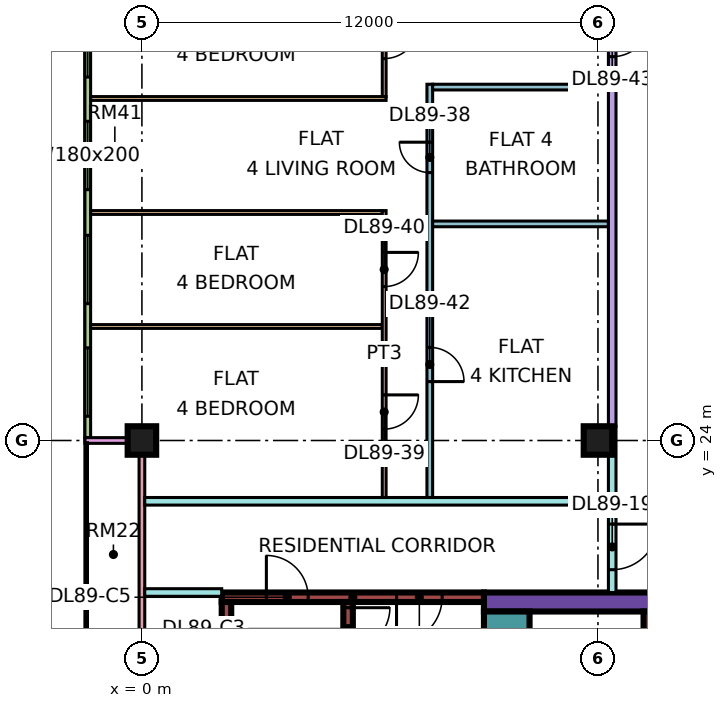
"""IFC4 building model, lengths in metres.
Left out: names, types, materials, properties, quantities, classifications, styles, units other than length and angle.
Written with IfcOpenShell. Run it as: python <this file> out.ifc"""

import sys

from ifc_helpers import new_model, si_unit, direction, frame, frame_2d, origin, origin_2d, place, context, subcontext, project, spatial, rectangle, extrude, element, fill, save


model = new_model("IFC4")
c1 = context("Model", 3, precision=1e-05, world=origin(), true_north=direction((0.0, 1.0)))
c2 = subcontext(c1, "Body", "Model", "MODEL_VIEW")
j1 = project(units=[si_unit("LENGTHUNIT", "METRE"), si_unit("PLANEANGLEUNIT", "RADIAN")], contexts=[c1])
p1 = place(None, origin())
s1 = spatial("IfcSite", under=j1, at=p1, CompositionType="ELEMENT")
p2 = place(p1, origin())
s2 = spatial("IfcBuilding", under=s1, at=p2, CompositionType="ELEMENT")
p3 = place(p2, frame((0.0, 0.0, 380.15)))
s3 = spatial("IfcBuildingStorey", under=s2, at=p3, CompositionType="ELEMENT", Elevation=380.15)
for number, where, z_axis, x_axis in (
    (1, (0.0, 24.0, 0.0), (0.0, 0.0, 1.0), (1.0, 0.0, 0.0)),
    (2, (12.0, 24.0, 0.0), (0.0, 0.0, 1.0), (1.0, 0.0, 0.0)),
):
    element("IfcColumn", number, at=place(p3, frame(where, z_axis=z_axis, x_axis=x_axis)), inside=s3, PredefinedType="COLUMN", context=c2, shape_type="SweptSolid", body=[
        extrude(rectangle(XDim=0.75, YDim=0.75, at=origin_2d()), origin(), (0.0, 0.0, 1.0), 3.75),
    ])
p4 = place(p3, frame((9.0, 19.75, 0.0), z_axis=(0.0, 0.0, 1.0), x_axis=(1.0, 0.0, 0.0)))
e3 = element("IfcWall", 3, at=p4, inside=s3, PredefinedType="SHEAR", context=c2, shape_type="SweptSolid", body=[
    extrude(rectangle(XDim=25.0, YDim=0.5, at=frame_2d((12.5, 0.0))), origin(), (0.0, 0.0, 1.0), 3.75),
])
p5 = place(p4, frame((19.1, 0.0, 0.0)))
e4 = element("IfcOpeningElement", 4, at=p5, cuts=e3, PredefinedType="OPENING", context=c2, shape_type="SweptSolid", body=[
    extrude(rectangle(XDim=1.8, YDim=2.4, at=frame_2d((0.9, 1.2))), frame((0.0, 0.26, 0.0), z_axis=(0.0, -1.0, 0.0), x_axis=(1.0, 0.0, 0.0)), (0.0, 0.0, 1.0), 0.52),
])
p6 = place(p3, frame((9.6, 7.5, 0.0), z_axis=(0.0, 0.0, 1.0), x_axis=(0.0, 1.0, 0.0)))
e5 = element("IfcWall", 5, at=p6, inside=s3, PredefinedType="SHEAR", context=c2, shape_type="SweptSolid", body=[
    extrude(rectangle(XDim=12.0, YDim=1.2, at=frame_2d((6.0, 0.0))), origin(), (0.0, 0.0, 1.0), 3.75),
])
p7 = place(p6, frame((4.375, 0.0, 0.0)))
e6 = element("IfcOpeningElement", 6, at=p7, cuts=e5, PredefinedType="OPENING", context=c2, shape_type="SweptSolid", body=[
    extrude(rectangle(XDim=1.1, YDim=2.2, at=frame_2d((0.55, 1.1))), frame((0.0, 0.61, 0.0), z_axis=(0.0, -1.0, 0.0), x_axis=(1.0, 0.0, 0.0)), (0.0, 0.0, 1.0), 1.22),
])
p8 = place(p6, frame((6.875, 0.0, 0.0)))
e7 = element("IfcOpeningElement", 7, at=p8, cuts=e5, PredefinedType="OPENING", context=c2, shape_type="SweptSolid", body=[
    extrude(rectangle(XDim=1.1, YDim=2.2, at=frame_2d((0.55, 1.1))), frame((0.0, 0.61, 0.0), z_axis=(0.0, -1.0, 0.0), x_axis=(1.0, 0.0, 0.0)), (0.0, 0.0, 1.0), 1.22),
])
p9 = place(p6, frame((9.85, 0.0, 0.0)))
e8 = element("IfcOpeningElement", 8, at=p9, cuts=e5, PredefinedType="OPENING", context=c2, shape_type="SweptSolid", body=[
    extrude(rectangle(XDim=1.1, YDim=2.2, at=frame_2d((0.55, 1.1))), frame((0.0, 0.61, 0.0), z_axis=(0.0, -1.0, 0.0), x_axis=(1.0, 0.0, 0.0)), (0.0, 0.0, 1.0), 1.22),
])
p10 = place(p6, frame((2.05, 0.0, 0.0)))
e9 = element("IfcOpeningElement", 9, at=p10, cuts=e5, PredefinedType="OPENING", context=c2, shape_type="SweptSolid", body=[
    extrude(rectangle(XDim=0.9, YDim=2.1, at=frame_2d((0.45, 1.05))), frame((0.0, 0.61, 0.0), z_axis=(0.0, -1.0, 0.0), x_axis=(1.0, 0.0, 0.0)), (0.0, 0.0, 1.0), 1.22),
])
p11 = place(p3, frame((13.325, 7.5, 0.0), z_axis=(0.0, 0.0, 1.0), x_axis=(0.0, 1.0, 0.0)))
e10 = element("IfcWall", 10, at=p11, inside=s3, PredefinedType="SHEAR", context=c2, shape_type="SweptSolid", body=[
    extrude(rectangle(XDim=12.0, YDim=0.25, at=frame_2d((6.0, 0.0))), origin(), (0.0, 0.0, 1.0), 3.75),
])
p12 = place(p3, frame((2.1, 19.875, 0.0), z_axis=(0.0, 0.0, 1.0), x_axis=(1.0, 0.0, 0.0)))
e11 = element("IfcWall", 11, at=p12, inside=s3, PredefinedType="SHEAR", context=c2, shape_type="SweptSolid", body=[
    extrude(rectangle(XDim=6.9, YDim=0.25, at=frame_2d((3.45, 0.0))), origin(), (0.0, 0.0, 1.0), 3.75),
])
p13 = place(p12, frame((1.175, 0.0, 0.0)))
e12 = element("IfcOpeningElement", 12, at=p13, cuts=e11, PredefinedType="OPENING", context=c2, shape_type="SweptSolid", body=[
    extrude(rectangle(XDim=1.1, YDim=2.2, at=frame_2d((0.55, 1.1))), frame((0.0, 0.135, 0.0), z_axis=(0.0, -1.0, 0.0), x_axis=(1.0, 0.0, 0.0)), (0.0, 0.0, 1.0), 0.27),
])
p14 = place(p12, frame((4.6, 0.0, 0.0)))
e13 = element("IfcOpeningElement", 13, at=p14, cuts=e11, PredefinedType="OPENING", context=c2, shape_type="SweptSolid", body=[
    extrude(rectangle(XDim=1.2, YDim=2.2, at=frame_2d((0.6, 1.1))), frame((0.0, 0.135, 0.0), z_axis=(0.0, -1.0, 0.0), x_axis=(1.0, 0.0, 0.0)), (0.0, 0.0, 1.0), 0.27),
])
p15 = place(p3, frame((2.225, 13.25, 0.0), z_axis=(0.0, 0.0, 1.0), x_axis=(0.0, 1.0, 0.0)))
e14 = element("IfcWall", 14, at=p15, inside=s3, PredefinedType="SHEAR", context=c2, shape_type="SweptSolid", body=[
    extrude(rectangle(XDim=6.5, YDim=0.25, at=frame_2d((3.25, 0.0))), origin(), (0.0, 0.0, 1.0), 3.75),
])
p16 = place(p3, frame((5.425, 13.25, 0.0), z_axis=(0.0, 0.0, 1.0), x_axis=(0.0, 1.0, 0.0)))
e15 = element("IfcWall", 15, at=p16, inside=s3, PredefinedType="SHEAR", context=c2, shape_type="SweptSolid", body=[
    extrude(rectangle(XDim=6.5, YDim=0.25, at=frame_2d((3.25, 0.0))), origin(), (0.0, 0.0, 1.0), 3.75),
])
p17 = place(p16, frame((5.25, 0.0, 0.0)))
e16 = element("IfcOpeningElement", 16, at=p17, cuts=e15, PredefinedType="OPENING", context=c2, shape_type="SweptSolid", body=[
    extrude(rectangle(XDim=1.1, YDim=2.2, at=frame_2d((0.55, 1.1))), frame((0.0, 0.135, 0.0), z_axis=(0.0, -1.0, 0.0), x_axis=(1.0, 0.0, 0.0)), (0.0, 0.0, 1.0), 0.27),
])
p18 = place(p3, frame((-1.425, 35.925, 0.0), z_axis=(0.0, 0.0, 1.0), x_axis=(0.0, -1.0, 0.0)))
e17 = element("IfcWall", 17, at=p18, inside=s3, PredefinedType="SOLIDWALL", context=c2, shape_type="SweptSolid", body=[
    extrude(rectangle(XDim=11.85, YDim=0.15, at=frame_2d((5.925, 0.0))), origin(), (0.0, 0.0, 1.0), 3.3),
])
p19 = place(p18, frame((0.562, 0.0, 0.45)))
e18 = element("IfcOpeningElement", 18, at=p19, cuts=e17, PredefinedType="OPENING", context=c2, shape_type="SweptSolid", body=[
    extrude(rectangle(XDim=1.8, YDim=2.0, at=frame_2d((0.9, 1.0))), frame((0.0, 0.085, 0.0), z_axis=(0.0, -1.0, 0.0), x_axis=(1.0, 0.0, 0.0)), (0.0, 0.0, 1.0), 0.17),
])
p20 = place(p18, frame((3.525, 0.0, 0.45)))
e19 = element("IfcOpeningElement", 19, at=p20, cuts=e17, PredefinedType="OPENING", context=c2, shape_type="SweptSolid", body=[
    extrude(rectangle(XDim=1.8, YDim=2.0, at=frame_2d((0.9, 1.0))), frame((0.0, 0.085, 0.0), z_axis=(0.0, -1.0, 0.0), x_axis=(1.0, 0.0, 0.0)), (0.0, 0.0, 1.0), 0.17),
])
p21 = place(p18, frame((6.525, 0.0, 0.45)))
e20 = element("IfcOpeningElement", 20, at=p21, cuts=e17, PredefinedType="OPENING", context=c2, shape_type="SweptSolid", body=[
    extrude(rectangle(XDim=1.8, YDim=2.0, at=frame_2d((0.9, 1.0))), frame((0.0, 0.085, 0.0), z_axis=(0.0, -1.0, 0.0), x_axis=(1.0, 0.0, 0.0)), (0.0, 0.0, 1.0), 0.17),
])
p22 = place(p18, frame((9.488, 0.0, 0.45)))
e21 = element("IfcOpeningElement", 21, at=p22, cuts=e17, PredefinedType="OPENING", context=c2, shape_type="SweptSolid", body=[
    extrude(rectangle(XDim=1.8, YDim=2.0, at=frame_2d((0.9, 1.0))), frame((0.0, 0.085, 0.0), z_axis=(0.0, -1.0, 0.0), x_axis=(1.0, 0.0, 0.0)), (0.0, 0.0, 1.0), 0.17),
])
p23 = place(p3, frame((0.0, 23.925, 0.0), z_axis=(0.0, 0.0, 1.0), x_axis=(0.0, -1.0, 0.0)))
e22 = element("IfcWall", 22, at=p23, inside=s3, PredefinedType="SOLIDWALL", context=c2, shape_type="SweptSolid", body=[
    extrude(rectangle(XDim=11.35, YDim=0.15, at=frame_2d((5.675, 0.0))), origin(), (0.0, 0.0, 1.0), 3.3),
])
p24 = place(p23, frame((6.738, 0.0, 0.0)))
e23 = element("IfcOpeningElement", 23, at=p24, cuts=e22, PredefinedType="OPENING", context=c2, shape_type="SweptSolid", body=[
    extrude(rectangle(XDim=1.8, YDim=2.4, at=frame_2d((0.9, 1.2))), frame((0.0, 0.085, 0.0), z_axis=(0.0, -1.0, 0.0), x_axis=(1.0, 0.0, 0.0)), (0.0, 0.0, 1.0), 0.17),
])
p25 = place(p3, frame((-1.5, 24.0, 0.0), z_axis=(0.0, 0.0, 1.0), x_axis=(1.0, 0.0, 0.0)))
e24 = element("IfcWall", 24, at=p25, inside=s3, PredefinedType="SOLIDWALL", context=c2, shape_type="SweptSolid", body=[
    extrude(rectangle(XDim=1.5, YDim=0.15, at=frame_2d((0.75, 0.0))), origin(), (0.0, 0.0, 1.0), 3.3),
])
p26 = place(p3, frame((-1.351, 27.0, 0.0), z_axis=(0.0, 0.0, 1.0), x_axis=(1.0, 0.0, 0.0)))
e25 = element("IfcWall", 25, at=p26, inside=s3, PredefinedType="PARTITIONING", context=c2, shape_type="SweptSolid", body=[
    extrude(rectangle(XDim=7.676, YDim=0.1, at=frame_2d((3.838, 0.0))), origin(), (0.0, 0.0, 1.0), 3.3),
])
p27 = place(p3, frame((-1.35, 30.0, 0.0), z_axis=(0.0, 0.0, 1.0), x_axis=(1.0, 0.0, 0.0)))
e26 = element("IfcWall", 26, at=p27, inside=s3, PredefinedType="PARTITIONING", context=c2, shape_type="SweptSolid", body=[
    extrude(rectangle(XDim=7.675, YDim=0.1, at=frame_2d((3.837, 0.0))), origin(), (0.0, 0.0, 1.0), 3.3),
])
p28 = place(p3, frame((-1.35, 33.0, 0.0), z_axis=(0.0, 0.0, 1.0), x_axis=(1.0, 0.0, 0.0)))
e27 = element("IfcWall", 27, at=p28, inside=s3, PredefinedType="PARTITIONING", context=c2, shape_type="SweptSolid", body=[
    extrude(rectangle(XDim=7.775, YDim=0.1, at=frame_2d((3.888, 0.0))), origin(), (0.0, 0.0, 1.0), 3.3),
])
p29 = place(p3, frame((0.074, 20.0, 0.0), z_axis=(0.0, 0.0, 1.0), x_axis=(1.0, 0.0, 0.0)))
e28 = element("IfcWall", 28, at=p29, inside=s3, PredefinedType="PARTITIONING", context=c2, shape_type="SweptSolid", body=[
    extrude(rectangle(XDim=2.026, YDim=0.2, at=frame_2d((1.013, 0.0))), origin(), (0.0, 0.0, 1.0), 3.3),
])
p30 = place(p3, frame((0.074, 22.4, 0.0), z_axis=(0.0, 0.0, 1.0), x_axis=(1.0, 0.0, 0.0)))
e29 = element("IfcWall", 29, at=p30, inside=s3, PredefinedType="PARTITIONING", context=c2, shape_type="SweptSolid", body=[
    extrude(rectangle(XDim=12.201, YDim=0.2, at=frame_2d((6.101, 0.0))), origin(), (0.0, 0.0, 1.0), 3.3),
])
p31 = place(p3, frame((6.375, 22.5, 0.0), z_axis=(0.0, 0.0, 1.0), x_axis=(0.0, 1.0, 0.0)))
e30 = element("IfcWall", 30, at=p31, inside=s3, PredefinedType="PARTITIONING", context=c2, shape_type="SweptSolid", body=[
    extrude(rectangle(XDim=7.55, YDim=0.1, at=frame_2d((3.775, 0.0))), origin(), (0.0, 0.0, 1.0), 3.3),
])
p32 = place(p31, frame((1.8, 0.0, 0.0)))
e31 = element("IfcOpeningElement", 31, at=p32, cuts=e30, PredefinedType="OPENING", context=c2, shape_type="SweptSolid", body=[
    extrude(rectangle(XDim=0.9, YDim=2.1, at=frame_2d((0.45, 1.05))), frame((0.0, 0.06, 0.0), z_axis=(0.0, -1.0, 0.0), x_axis=(1.0, 0.0, 0.0)), (0.0, 0.0, 1.0), 0.12),
])
p33 = place(p31, frame((5.55, 0.0, 0.0)))
e32 = element("IfcOpeningElement", 32, at=p33, cuts=e30, PredefinedType="OPENING", context=c2, shape_type="SweptSolid", body=[
    extrude(rectangle(XDim=0.9, YDim=2.1, at=frame_2d((0.45, 1.05))), frame((0.0, 0.06, 0.0), z_axis=(0.0, -1.0, 0.0), x_axis=(1.0, 0.0, 0.0)), (0.0, 0.0, 1.0), 0.12),
])
p34 = place(p3, frame((6.375, 33.05, 0.0), z_axis=(0.0, 0.0, 1.0), x_axis=(0.0, 1.0, 0.0)))
e33 = element("IfcWall", 33, at=p34, inside=s3, PredefinedType="PARTITIONING", context=c2, shape_type="SweptSolid", body=[
    extrude(rectangle(XDim=2.85, YDim=0.1, at=frame_2d((1.425, 0.0))), origin(), (0.0, 0.0, 1.0), 3.3),
])
p35 = place(p34, frame((1.0, 0.0, 0.0)))
e34 = element("IfcOpeningElement", 34, at=p35, cuts=e33, PredefinedType="OPENING", context=c2, shape_type="SweptSolid", body=[
    extrude(rectangle(XDim=0.9, YDim=2.1, at=frame_2d((0.45, 1.05))), frame((0.0, 0.06, 0.0), z_axis=(0.0, -1.0, 0.0), x_axis=(1.0, 0.0, 0.0)), (0.0, 0.0, 1.0), 0.12),
])
p36 = place(p3, frame((7.575, 22.5, 0.0), z_axis=(0.0, 0.0, 1.0), x_axis=(0.0, 1.0, 0.0)))
e35 = element("IfcWall", 35, at=p36, inside=s3, PredefinedType="PARTITIONING", context=c2, shape_type="SweptSolid", body=[
    extrude(rectangle(XDim=10.875, YDim=0.15, at=frame_2d((5.438, 0.0))), origin(), (0.0, 0.0, 1.0), 3.3),
])
p37 = place(p36, frame((8.55, 0.0, 0.0)))
e36 = element("IfcOpeningElement", 36, at=p37, cuts=e35, PredefinedType="OPENING", context=c2, shape_type="SweptSolid", body=[
    extrude(rectangle(XDim=0.8, YDim=2.1, at=frame_2d((0.4, 1.05))), frame((0.0, 0.085, 0.0), z_axis=(0.0, -1.0, 0.0), x_axis=(1.0, 0.0, 0.0)), (0.0, 0.0, 1.0), 0.17),
])
p38 = place(p36, frame((3.05, 0.0, 0.0)))
e37 = element("IfcOpeningElement", 37, at=p38, cuts=e35, PredefinedType="OPENING", context=c2, shape_type="SweptSolid", body=[
    extrude(rectangle(XDim=0.9, YDim=2.1, at=frame_2d((0.45, 1.05))), frame((0.0, 0.085, 0.0), z_axis=(0.0, -1.0, 0.0), x_axis=(1.0, 0.0, 0.0)), (0.0, 0.0, 1.0), 0.17),
])
for number, where, z_axis, x_axis in (
    (38, (7.65, 29.7, 0.0), (0.0, 0.0, 1.0), (1.0, 0.0, 0.0)),
    (39, (7.65, 33.3, 0.0), (0.0, 0.0, 1.0), (1.0, 0.0, 0.0)),
):
    element("IfcWall", number, at=place(p3, frame(where, z_axis=z_axis, x_axis=x_axis)), inside=s3, PredefinedType="PARTITIONING", context=c2, shape_type="SweptSolid", body=[
        extrude(rectangle(XDim=4.625, YDim=0.15, at=frame_2d((2.312, 0.0))), origin(), (0.0, 0.0, 1.0), 3.3),
    ])
p39 = place(p3, frame((12.375, 20.0, 0.0), z_axis=(0.0, 0.0, 1.0), x_axis=(0.0, 1.0, 0.0)))
e40 = element("IfcWall", 40, at=p39, inside=s3, PredefinedType="PARTITIONING", context=c2, shape_type="SweptSolid", body=[
    extrude(rectangle(XDim=4.375, YDim=0.2, at=frame_2d((2.188, 0.0))), origin(), (0.0, 0.0, 1.0), 3.3),
])
p40 = place(p39, frame((0.6, 0.0, 0.0)))
e41 = element("IfcOpeningElement", 41, at=p40, cuts=e40, PredefinedType="OPENING", context=c2, shape_type="SweptSolid", body=[
    extrude(rectangle(XDim=1.2, YDim=2.1, at=frame_2d((0.6, 1.05))), frame((0.0, 0.11, 0.0), z_axis=(0.0, -1.0, 0.0), x_axis=(1.0, 0.0, 0.0)), (0.0, 0.0, 1.0), 0.22),
])
p41 = place(p3, frame((12.375, 24.375, 0.0), z_axis=(0.0, 0.0, 1.0), x_axis=(0.0, 1.0, 0.0)))
e42 = element("IfcWall", 42, at=p41, inside=s3, PredefinedType="PARTITIONING", context=c2, shape_type="SweptSolid", body=[
    extrude(rectangle(XDim=11.25, YDim=0.2, at=frame_2d((5.625, 0.0))), origin(), (0.0, 0.0, 1.0), 2.8),
])
p42 = place(p41, frame((9.725, 0.0, 0.0)))
e43 = element("IfcOpeningElement", 43, at=p42, cuts=e42, PredefinedType="OPENING", context=c2, shape_type="SweptSolid", body=[
    extrude(rectangle(XDim=1.0, YDim=2.1, at=frame_2d((0.5, 1.05))), frame((0.0, 0.11, 0.0), z_axis=(0.0, -1.0, 0.0), x_axis=(1.0, 0.0, 0.0)), (0.0, 0.0, 1.0), 0.22),
])
p43 = place(p19, origin())
e44 = element("IfcWindow", 44, at=p43, inside=s3, PartitioningType="SINGLE_PANEL", PredefinedType="WINDOW", context=c2, shape_type="SweptSolid", body=[
    extrude(rectangle(XDim=1.8, YDim=2.0, at=frame_2d((0.9, 1.0))), frame((0.0, 0.03, 0.0), z_axis=(0.0, -1.0, 0.0), x_axis=(1.0, 0.0, 0.0)), (0.0, 0.0, 1.0), 0.06),
])
fill(e18, e44)
p44 = place(p20, origin())
e45 = element("IfcWindow", 45, at=p44, inside=s3, PartitioningType="SINGLE_PANEL", PredefinedType="WINDOW", context=c2, shape_type="SweptSolid", body=[
    extrude(rectangle(XDim=1.8, YDim=2.0, at=frame_2d((0.9, 1.0))), frame((0.0, 0.03, 0.0), z_axis=(0.0, -1.0, 0.0), x_axis=(1.0, 0.0, 0.0)), (0.0, 0.0, 1.0), 0.06),
])
fill(e19, e45)
p45 = place(p21, origin())
e46 = element("IfcWindow", 46, at=p45, inside=s3, PartitioningType="SINGLE_PANEL", PredefinedType="WINDOW", context=c2, shape_type="SweptSolid", body=[
    extrude(rectangle(XDim=1.8, YDim=2.0, at=frame_2d((0.9, 1.0))), frame((0.0, 0.03, 0.0), z_axis=(0.0, -1.0, 0.0), x_axis=(1.0, 0.0, 0.0)), (0.0, 0.0, 1.0), 0.06),
])
fill(e20, e46)
p46 = place(p22, origin())
e47 = element("IfcWindow", 47, at=p46, inside=s3, PartitioningType="SINGLE_PANEL", PredefinedType="WINDOW", context=c2, shape_type="SweptSolid", body=[
    extrude(rectangle(XDim=1.8, YDim=2.0, at=frame_2d((0.9, 1.0))), frame((0.0, 0.03, 0.0), z_axis=(0.0, -1.0, 0.0), x_axis=(1.0, 0.0, 0.0)), (0.0, 0.0, 1.0), 0.06),
])
fill(e21, e47)
p47 = place(p17, origin())
e48 = element("IfcDoor", 48, at=p47, inside=s3, OperationType="SINGLE_SWING_RIGHT", PredefinedType="DOOR", context=c2, shape_type="SweptSolid", body=[
    extrude(rectangle(XDim=1.1, YDim=2.2, at=frame_2d((0.55, 1.1))), frame((0.0, 0.025, 0.0), z_axis=(0.0, -1.0, 0.0), x_axis=(1.0, 0.0, 0.0)), (0.0, 0.0, 1.0), 0.05),
])
fill(e16, e48)
p48 = place(p13, origin())
e49 = element("IfcDoor", 49, at=p48, inside=s3, OperationType="SINGLE_SWING_LEFT", PredefinedType="DOOR", context=c2, shape_type="SweptSolid", body=[
    extrude(rectangle(XDim=1.1, YDim=2.2, at=frame_2d((0.55, 1.1))), frame((0.0, 0.025, 0.0), z_axis=(0.0, -1.0, 0.0), x_axis=(1.0, 0.0, 0.0)), (0.0, 0.0, 1.0), 0.05),
])
fill(e12, e49)
p49 = place(p14, frame((1.2, 0.0, 0.0), z_axis=(0.0, 0.0, 1.0), x_axis=(-1.0, 0.0, 0.0)))
e50 = element("IfcDoor", 50, at=p49, inside=s3, OperationType="SINGLE_SWING_LEFT", PredefinedType="DOOR", context=c2, shape_type="SweptSolid", body=[
    extrude(rectangle(XDim=1.2, YDim=2.2, at=frame_2d((0.6, 1.1))), frame((0.0, 0.025, 0.0), z_axis=(0.0, -1.0, 0.0), x_axis=(1.0, 0.0, 0.0)), (0.0, 0.0, 1.0), 0.05),
])
fill(e13, e50)
p50 = place(p40, origin())
e51 = element("IfcDoor", 51, at=p50, inside=s3, OperationType="SINGLE_SWING_RIGHT", PredefinedType="DOOR", context=c2, shape_type="SweptSolid", body=[
    extrude(rectangle(XDim=1.2, YDim=2.1, at=frame_2d((0.6, 1.05))), frame((0.0, 0.025, 0.0), z_axis=(0.0, -1.0, 0.0), x_axis=(1.0, 0.0, 0.0)), (0.0, 0.0, 1.0), 0.05),
])
fill(e41, e51)
p51 = place(p37, frame((0.8, 0.0, 0.0), z_axis=(0.0, 0.0, 1.0), x_axis=(-1.0, 0.0, 0.0)))
e52 = element("IfcDoor", 52, at=p51, inside=s3, OperationType="SINGLE_SWING_RIGHT", PredefinedType="DOOR", context=c2, shape_type="SweptSolid", body=[
    extrude(rectangle(XDim=0.8, YDim=2.1, at=frame_2d((0.4, 1.05))), frame((0.0, 0.025, 0.0), z_axis=(0.0, -1.0, 0.0), x_axis=(1.0, 0.0, 0.0)), (0.0, 0.0, 1.0), 0.05),
])
fill(e36, e52)
p52 = place(p32, origin())
e53 = element("IfcDoor", 53, at=p52, inside=s3, OperationType="SINGLE_SWING_RIGHT", PredefinedType="DOOR", context=c2, shape_type="SweptSolid", body=[
    extrude(rectangle(XDim=0.9, YDim=2.1, at=frame_2d((0.45, 1.05))), frame((0.0, 0.025, 0.0), z_axis=(0.0, -1.0, 0.0), x_axis=(1.0, 0.0, 0.0)), (0.0, 0.0, 1.0), 0.05),
])
fill(e31, e53)
p53 = place(p33, origin())
e54 = element("IfcDoor", 54, at=p53, inside=s3, OperationType="SINGLE_SWING_RIGHT", PredefinedType="DOOR", context=c2, shape_type="SweptSolid", body=[
    extrude(rectangle(XDim=0.9, YDim=2.1, at=frame_2d((0.45, 1.05))), frame((0.0, 0.025, 0.0), z_axis=(0.0, -1.0, 0.0), x_axis=(1.0, 0.0, 0.0)), (0.0, 0.0, 1.0), 0.05),
])
fill(e32, e54)
p54 = place(p35, origin())
e55 = element("IfcDoor", 55, at=p54, inside=s3, OperationType="SINGLE_SWING_RIGHT", PredefinedType="DOOR", context=c2, shape_type="SweptSolid", body=[
    extrude(rectangle(XDim=0.9, YDim=2.1, at=frame_2d((0.45, 1.05))), frame((0.0, 0.025, 0.0), z_axis=(0.0, -1.0, 0.0), x_axis=(1.0, 0.0, 0.0)), (0.0, 0.0, 1.0), 0.05),
])
fill(e34, e55)
p55 = place(p38, frame((0.9, 0.0, 0.0), z_axis=(0.0, 0.0, 1.0), x_axis=(-1.0, 0.0, 0.0)))
e56 = element("IfcDoor", 56, at=p55, inside=s3, OperationType="SINGLE_SWING_LEFT", PredefinedType="DOOR", context=c2, shape_type="SweptSolid", body=[
    extrude(rectangle(XDim=0.9, YDim=2.1, at=frame_2d((0.45, 1.05))), frame((0.0, 0.025, 0.0), z_axis=(0.0, -1.0, 0.0), x_axis=(1.0, 0.0, 0.0)), (0.0, 0.0, 1.0), 0.05),
])
fill(e37, e56)
p56 = place(p42, origin())
e57 = element("IfcDoor", 57, at=p56, inside=s3, OperationType="SINGLE_SWING_RIGHT", PredefinedType="DOOR", context=c2, shape_type="SweptSolid", body=[
    extrude(rectangle(XDim=1.0, YDim=2.1, at=frame_2d((0.5, 1.05))), frame((0.0, 0.025, 0.0), z_axis=(0.0, -1.0, 0.0), x_axis=(1.0, 0.0, 0.0)), (0.0, 0.0, 1.0), 0.05),
])
fill(e43, e57)
save(model, sys.argv[1])
